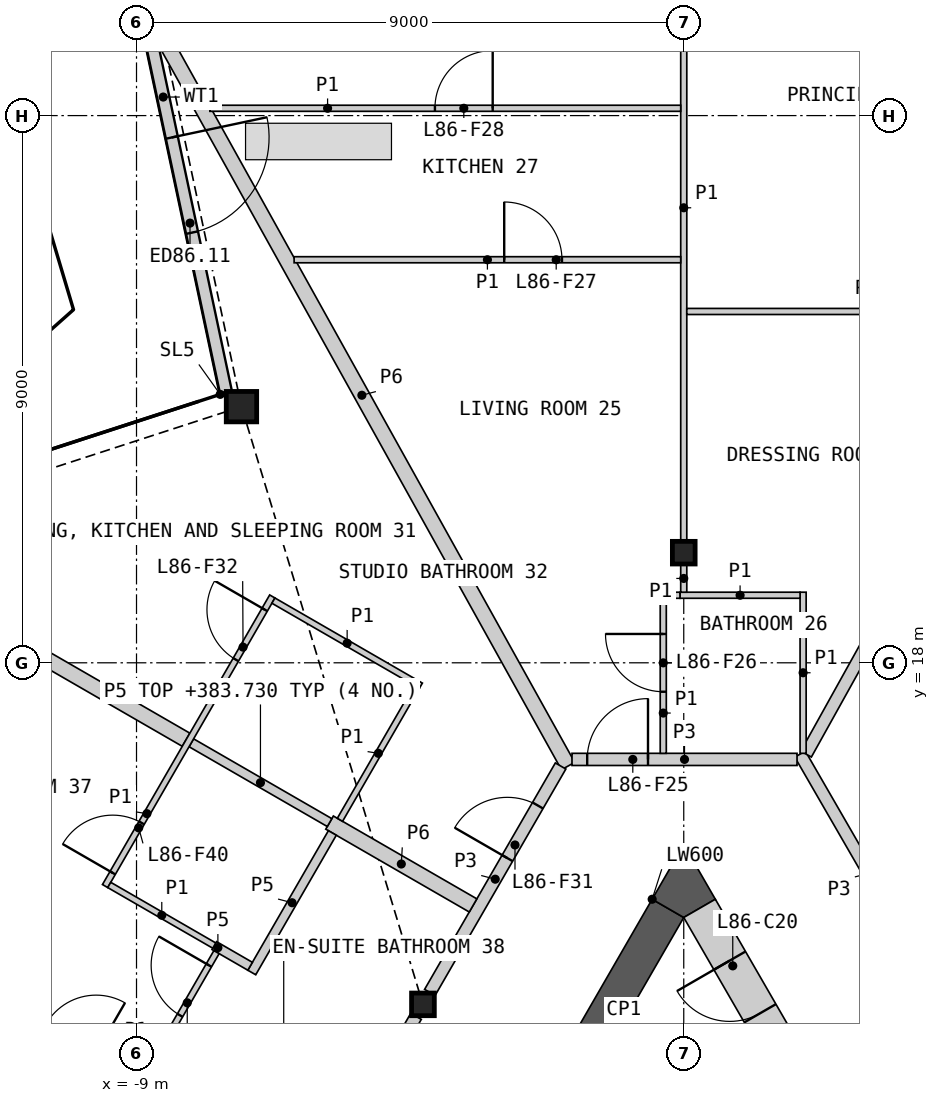
"""IFC4 building model, lengths in metres.
Left out: names, types, materials, properties, quantities, classifications, styles, units other than length and angle.
Written with IfcOpenShell. Run it as: python <this file> out.ifc"""

import sys

from ifc_helpers import new_model, si_unit, direction, frame, frame_2d, origin, origin_2d, place, context, subcontext, project, spatial, polyline, rectangle, hollow_rectangle, i_section, outline, extrude, element, fill, save


model = new_model("IFC4")
c1 = context("Model", 3, precision=1e-05, world=origin(), true_north=direction((0.0, 1.0)))
c2 = subcontext(c1, "Body", "Model", "MODEL_VIEW")
j1 = project(units=[si_unit("LENGTHUNIT", "METRE"), si_unit("PLANEANGLEUNIT", "RADIAN")], contexts=[c1])
p1 = place(None, origin())
s1 = spatial("IfcSite", under=j1, at=p1, CompositionType="ELEMENT")
p2 = place(p1, origin())
s2 = spatial("IfcBuilding", under=s1, at=p2, CompositionType="ELEMENT")
p3 = place(p2, frame((0.0, 0.0, 381.4)))
s3 = spatial("IfcBuildingStorey", under=s2, at=p3, CompositionType="ELEMENT", Elevation=381.4)
p4 = place(p3, frame((-7.274, 22.213, 0.0), z_axis=(0.0, 0.0, 1.0), x_axis=(1.0, 0.0, 0.0)))
e1 = element("IfcColumn", 1, at=p4, inside=s3, PredefinedType="COLUMN", context=c2, shape_type="SweptSolid", body=[
    extrude(hollow_rectangle(XDim=0.5, YDim=0.5, WallThickness=0.03, at=origin_2d()), origin(), (0.0, 0.0, 1.0), 3.4),
])
for number, where, z_axis, x_axis in (
    (2, (0.0, 19.811, 0.0), (0.0, 0.0, 1.0), (1.0, 0.0, 0.0)),
    (3, (-4.289, 12.382, 0.0), (0.0, 0.0, 1.0), (1.0, 0.0, 0.0)),
):
    element("IfcColumn", number, at=place(p3, frame(where, z_axis=z_axis, x_axis=x_axis)), inside=s3, PredefinedType="COLUMN", context=c2, shape_type="SweptSolid", body=[
        extrude(i_section(OverallWidth=0.374, OverallDepth=0.372, WebThickness=0.016, FlangeThickness=0.026, at=origin_2d()), origin(), (0.0, 0.0, 1.0), 3.4),
    ])
p5 = place(p3, frame((-8.905, 28.922, 0.0), z_axis=(0.0, 0.0, 1.0), x_axis=(0.207917488951, -0.978146368285, 0.0)))
e4 = element("IfcWall", 4, at=p5, inside=s3, PredefinedType="SOLIDWALL", context=c2, shape_type="SweptSolid", body=[
    extrude(rectangle(XDim=6.612, YDim=0.2, at=frame_2d((3.306, 0.0))), origin(), (0.0, 0.0, 1.0), 2.634),
])
p6 = place(p5, frame((2.333, 0.0, 0.0)))
e5 = element("IfcOpeningElement", 5, at=p6, cuts=e4, PredefinedType="OPENING", context=c2, shape_type="SweptSolid", body=[
    extrude(rectangle(XDim=1.6, YDim=2.25, at=frame_2d((0.8, 1.125))), frame((0.0, 0.11, 0.0), z_axis=(0.0, -1.0, 0.0), x_axis=(1.0, 0.0, 0.0)), (0.0, 0.0, 1.0), 0.22),
])
p7 = place(p3, frame((-0.26, 13.961, 0.0), z_axis=(0.0, 0.0, 1.0), x_axis=(-0.499980485389, -0.866036670257, 0.0)))
e6 = element("IfcWall", 6, at=p7, inside=s3, PredefinedType="SHEAR", context=c2, shape_type="SweptSolid", body=[
    extrude(rectangle(XDim=4.559, YDim=0.6, at=frame_2d((2.28, 0.0))), origin(), (0.0, 0.0, 1.0), 3.1),
])
p8 = place(p3, origin())
e7 = element("IfcWall", 7, at=p8, inside=s3, PredefinedType="SHEAR", context=c2, shape_type="SweptSolid", body=[
    extrude(outline(polyline([(-0.52, 14.111), (0.0, 15.011), (0.52, 14.111), (0.0, 13.811), (-0.52, 14.111)])), origin(), (0.0, 0.0, 1.0), 3.1),
])
p9 = place(p3, frame((1.556, 11.716, 0.0), z_axis=(0.0, 0.0, 1.0), x_axis=(-0.500018667571, 0.866014625789, 0.0)))
e8 = element("IfcWall", 8, at=p9, inside=s3, PredefinedType="SHEAR", context=c2, shape_type="SweptSolid", body=[
    extrude(rectangle(XDim=2.592, YDim=0.6, at=frame_2d((1.296, 0.0))), origin(), (0.0, 0.0, 1.0), 3.1),
])
p10 = place(p9, frame((0.6, 0.0, 0.0)))
e9 = element("IfcOpeningElement", 9, at=p10, cuts=e8, PredefinedType="OPENING", context=c2, shape_type="SweptSolid", body=[
    extrude(rectangle(XDim=1.0, YDim=2.1, at=frame_2d((0.5, 1.05))), frame((0.0, 0.31, 0.0), z_axis=(0.0, -1.0, 0.0), x_axis=(1.0, 0.0, 0.0)), (0.0, 0.0, 1.0), 0.62),
])
p11 = place(p3, frame((-8.685, 28.499, 0.0), z_axis=(0.0, 0.0, 1.0), x_axis=(0.486017177904, -0.873949256412, 0.0)))
e10 = element("IfcWall", 10, at=p11, inside=s3, PredefinedType="PARTITIONING", context=c2, shape_type="SweptSolid", body=[
    extrude(rectangle(XDim=13.956, YDim=0.25, at=frame_2d((6.978, 0.0))), origin(), (0.0, 0.0, 1.0), 2.33),
])
p12 = place(p3, frame((-8.465, 5.15, 0.0), z_axis=(0.0, 0.0, 1.0), x_axis=(0.499992155518, 0.866029932751, 0.0)))
e11 = element("IfcWall", 11, at=p12, inside=s3, PredefinedType="PARTITIONING", context=c2, shape_type="SweptSolid", body=[
    extrude(rectangle(XDim=8.123, YDim=0.2, at=frame_2d((4.062, 0.0))), origin(), (0.0, 0.0, 1.0), 3.1),
])
p13 = place(p12, frame((1.153, 0.0, 0.0)))
e12 = element("IfcOpeningElement", 12, at=p13, cuts=e11, PredefinedType="OPENING", context=c2, shape_type="SweptSolid", body=[
    extrude(rectangle(XDim=1.0, YDim=2.1, at=frame_2d((0.5, 1.05))), frame((0.0, 0.11, 0.0), z_axis=(0.0, -1.0, 0.0), x_axis=(1.0, 0.0, 0.0)), (0.0, 0.0, 1.0), 0.22),
])
p14 = place(p3, frame((-13.669, 19.9, 0.0), z_axis=(0.0, 0.0, 1.0), x_axis=(0.866032778651, -0.499987226139, 0.0)))
e13 = element("IfcWall", 13, at=p14, inside=s3, PredefinedType="PARTITIONING", context=c2, shape_type="SweptSolid", body=[
    extrude(rectangle(XDim=6.332, YDim=0.25, at=frame_2d((3.166, 0.0))), origin(), (0.0, 0.0, 1.0), 2.33),
])
p15 = place(p3, frame((1.913, 16.498, 0.0), z_axis=(0.0, 0.0, 1.0), x_axis=(0.499974648164, -0.866040040179, 0.0)))
e14 = element("IfcWall", 14, at=p15, inside=s3, PredefinedType="PARTITIONING", context=c2, shape_type="SweptSolid", body=[
    extrude(rectangle(XDim=4.525, YDim=0.2, at=frame_2d((2.263, 0.0))), origin(), (0.0, 0.0, 1.0), 3.1),
])
p16 = place(p3, frame((-4.176, 12.579, 0.0), z_axis=(0.0, 0.0, 1.0), x_axis=(0.500004215162, 0.866022970146, 0.0)))
e15 = element("IfcWall", 15, at=p16, inside=s3, PredefinedType="PARTITIONING", context=c2, shape_type="SweptSolid", body=[
    extrude(rectangle(XDim=4.3, YDim=0.2, at=frame_2d((2.15, 0.0))), origin(), (0.0, 0.0, 1.0), 3.1),
])
p17 = place(p16, frame((2.55, 0.0, 0.0)))
e16 = element("IfcOpeningElement", 16, at=p17, cuts=e15, PredefinedType="OPENING", context=c2, shape_type="SweptSolid", body=[
    extrude(rectangle(XDim=1.0, YDim=2.1, at=frame_2d((0.5, 1.05))), frame((0.0, 0.11, 0.0), z_axis=(0.0, -1.0, 0.0), x_axis=(1.0, 0.0, 0.0)), (0.0, 0.0, 1.0), 0.22),
])
p18 = place(p3, frame((-1.838, 16.411, 0.0), z_axis=(0.0, 0.0, 1.0), x_axis=(1.0, 0.0, 0.0)))
e17 = element("IfcWall", 17, at=p18, inside=s3, PredefinedType="PARTITIONING", context=c2, shape_type="SweptSolid", body=[
    extrude(rectangle(XDim=3.701, YDim=0.2, at=frame_2d((1.851, 0.0))), origin(), (0.0, 0.0, 1.0), 3.1),
])
p19 = place(p18, frame((0.25, 0.0, 0.0)))
e18 = element("IfcOpeningElement", 18, at=p19, cuts=e17, PredefinedType="OPENING", context=c2, shape_type="SweptSolid", body=[
    extrude(rectangle(XDim=1.0, YDim=2.1, at=frame_2d((0.5, 1.05))), frame((0.0, 0.11, 0.0), z_axis=(0.0, -1.0, 0.0), x_axis=(1.0, 0.0, 0.0)), (0.0, 0.0, 1.0), 0.22),
])
p20 = place(p3, frame((-5.825, 15.372, 0.0), z_axis=(0.0, 0.0, 1.0), x_axis=(0.866051307416, -0.49995513091, 0.0)))
e19 = element("IfcWall", 19, at=p20, inside=s3, PredefinedType="PARTITIONING", context=c2, shape_type="SweptSolid", body=[
    extrude(rectangle(XDim=2.725, YDim=0.25, at=frame_2d((1.362, 0.0))), origin(), (0.0, 0.0, 1.0), 2.33),
])
p21 = place(p3, frame((2.012, 16.498, 0.0), z_axis=(0.0, 0.0, 1.0), x_axis=(0.485991996179, 0.873963259897, 0.0)))
e20 = element("IfcWall", 20, at=p21, inside=s3, PredefinedType="PARTITIONING", context=c2, shape_type="SweptSolid", body=[
    extrude(rectangle(XDim=14.073, YDim=0.2, at=frame_2d((7.036, 0.0))), origin(), (0.0, 0.0, 1.0), 2.33),
])
p22 = place(p3, frame((-8.098, 16.684, 0.0), z_axis=(0.0, 0.0, 1.0), x_axis=(0.866036909293, -0.499980071345, 0.0)))
e21 = element("IfcWall", 21, at=p22, inside=s3, PredefinedType="PLUMBINGWALL", context=c2, shape_type="SweptSolid", body=[
    extrude(rectangle(XDim=2.625, YDim=0.15, at=frame_2d((1.312, 0.0))), origin(), (0.0, 0.0, 1.0), 2.33),
])
p23 = place(p3, frame((-7.104, 12.906, 0.0), z_axis=(0.0, 0.0, 1.0), x_axis=(0.499993606316, 0.866029095148, 0.0)))
e22 = element("IfcWall", 22, at=p23, inside=s3, PredefinedType="PLUMBINGWALL", context=c2, shape_type="SweptSolid", body=[
    extrude(rectangle(XDim=2.65, YDim=0.15, at=frame_2d((1.325, 0.0))), origin(), (0.0, 0.0, 1.0), 2.33),
])
p24 = place(p3, frame((-7.72, 13.349, 0.0), z_axis=(0.0, 0.0, 1.0), x_axis=(0.866113839764, -0.499846793097, 0.0)))
e23 = element("IfcWall", 23, at=p24, inside=s3, PredefinedType="PLUMBINGWALL", context=c2, shape_type="SweptSolid", body=[
    extrude(rectangle(XDim=0.68, YDim=0.15, at=frame_2d((0.34, 0.0))), origin(), (0.0, 0.0, 1.0), 2.33),
])
p25 = place(p3, frame((0.0, 20.008, 0.0), z_axis=(0.0, 0.0, 1.0), x_axis=(0.0, 1.0, 0.0)))
e24 = element("IfcWall", 24, at=p25, inside=s3, PredefinedType="PARTITIONING", context=c2, shape_type="SweptSolid", body=[
    extrude(rectangle(XDim=10.951, YDim=0.1, at=frame_2d((5.476, 0.0))), origin(), (0.0, 0.0, 1.0), 2.33),
])
p26 = place(p25, frame((8.851, 0.0, 0.0)))
e25 = element("IfcOpeningElement", 25, at=p26, cuts=e24, PredefinedType="OPENING", context=c2, shape_type="SweptSolid", body=[
    extrude(rectangle(XDim=0.95, YDim=2.1, at=frame_2d((0.475, 1.05))), frame((0.0, 0.06, 0.0), z_axis=(0.0, -1.0, 0.0), x_axis=(1.0, 0.0, 0.0)), (0.0, 0.0, 1.0), 0.12),
])
p27 = place(p3, frame((-7.793, 27.12, 0.0), z_axis=(0.0, 0.0, 1.0), x_axis=(1.0, 0.0, 0.0)))
e26 = element("IfcWall", 26, at=p27, inside=s3, PredefinedType="PARTITIONING", context=c2, shape_type="SweptSolid", body=[
    extrude(rectangle(XDim=7.743, YDim=0.1, at=frame_2d((3.872, 0.0))), origin(), (0.0, 0.0, 1.0), 2.33),
])
p28 = place(p27, frame((3.701, 0.0, 0.0)))
e27 = element("IfcOpeningElement", 27, at=p28, cuts=e26, PredefinedType="OPENING", context=c2, shape_type="SweptSolid", body=[
    extrude(rectangle(XDim=0.95, YDim=2.1, at=frame_2d((0.475, 1.05))), frame((0.0, 0.06, 0.0), z_axis=(0.0, -1.0, 0.0), x_axis=(1.0, 0.0, 0.0)), (0.0, 0.0, 1.0), 0.12),
])
p29 = place(p3, frame((-6.408, 24.629, 0.0), z_axis=(0.0, 0.0, 1.0), x_axis=(1.0, 0.0, 0.0)))
e28 = element("IfcWall", 28, at=p29, inside=s3, PredefinedType="PARTITIONING", context=c2, shape_type="SweptSolid", body=[
    extrude(rectangle(XDim=6.358, YDim=0.1, at=frame_2d((3.179, 0.0))), origin(), (0.0, 0.0, 1.0), 2.33),
])
p30 = place(p29, frame((3.455, 0.0, 0.0)))
e29 = element("IfcOpeningElement", 29, at=p30, cuts=e28, PredefinedType="OPENING", context=c2, shape_type="SweptSolid", body=[
    extrude(rectangle(XDim=0.95, YDim=2.1, at=frame_2d((0.475, 1.05))), frame((0.0, 0.06, 0.0), z_axis=(0.0, -1.0, 0.0), x_axis=(1.0, 0.0, 0.0)), (0.0, 0.0, 1.0), 0.12),
])
p31 = place(p3, frame((0.05, 23.778, 0.0), z_axis=(0.0, 0.0, 1.0), x_axis=(1.0, 0.0, 0.0)))
e30 = element("IfcWall", 30, at=p31, inside=s3, PredefinedType="PARTITIONING", context=c2, shape_type="SweptSolid", body=[
    extrude(rectangle(XDim=5.91, YDim=0.1, at=frame_2d((2.955, 0.0))), origin(), (0.0, 0.0, 1.0), 2.33),
])
p32 = place(p31, frame((3.291, 0.0, 0.0)))
e31 = element("IfcOpeningElement", 31, at=p32, cuts=e30, PredefinedType="OPENING", context=c2, shape_type="SweptSolid", body=[
    extrude(rectangle(XDim=0.95, YDim=2.1, at=frame_2d((0.475, 1.05))), frame((0.0, 0.06, 0.0), z_axis=(0.0, -1.0, 0.0), x_axis=(1.0, 0.0, 0.0)), (0.0, 0.0, 1.0), 0.12),
])
p33 = place(p3, frame((-9.517, 14.328, 0.0), z_axis=(0.0, 0.0, 1.0), x_axis=(0.499996545922, 0.866027397988, 0.0)))
e32 = element("IfcWall", 32, at=p33, inside=s3, PredefinedType="PARTITIONING", context=c2, shape_type="SweptSolid", body=[
    extrude(rectangle(XDim=5.5, YDim=0.1, at=frame_2d((2.75, 0.0))), origin(), (0.0, 0.0, 1.0), 2.33),
])
p34 = place(p33, frame((4.3, 0.0, 0.0)))
e33 = element("IfcOpeningElement", 33, at=p34, cuts=e32, PredefinedType="OPENING", context=c2, shape_type="SweptSolid", body=[
    extrude(rectangle(XDim=0.95, YDim=2.1, at=frame_2d((0.475, 1.05))), frame((0.0, 0.06, 0.0), z_axis=(0.0, -1.0, 0.0), x_axis=(1.0, 0.0, 0.0)), (0.0, 0.0, 1.0), 0.12),
])
p35 = place(p33, frame((0.25, 0.0, 0.0)))
e34 = element("IfcOpeningElement", 34, at=p35, cuts=e32, PredefinedType="OPENING", context=c2, shape_type="SweptSolid", body=[
    extrude(rectangle(XDim=0.95, YDim=2.1, at=frame_2d((0.475, 1.05))), frame((0.0, 0.06, 0.0), z_axis=(0.0, -1.0, 0.0), x_axis=(1.0, 0.0, 0.0)), (0.0, 0.0, 1.0), 0.12),
])
p36 = place(p3, frame((-12.214, 13.056, 0.0), z_axis=(0.0, 0.0, 1.0), x_axis=(0.866017452598, -0.500013771606, 0.0)))
e35 = element("IfcWall", 35, at=p36, inside=s3, PredefinedType="PARTITIONING", context=c2, shape_type="SweptSolid", body=[
    extrude(rectangle(XDim=4.425, YDim=0.1, at=frame_2d((2.213, 0.0))), origin(), (0.0, 0.0, 1.0), 2.33),
])
p37 = place(p36, frame((1.994, 0.0, 0.0)))
e36 = element("IfcOpeningElement", 36, at=p37, cuts=e35, PredefinedType="OPENING", context=c2, shape_type="SweptSolid", body=[
    extrude(rectangle(XDim=0.95, YDim=2.1, at=frame_2d((0.475, 1.05))), frame((0.0, 0.06, 0.0), z_axis=(0.0, -1.0, 0.0), x_axis=(1.0, 0.0, 0.0)), (0.0, 0.0, 1.0), 0.12),
])
p38 = place(p3, frame((-6.748, 19.023, 0.0), z_axis=(0.0, 0.0, 1.0), x_axis=(0.866034573852, -0.49998411664, 0.0)))
e37 = element("IfcWall", 37, at=p38, inside=s3, PredefinedType="PARTITIONING", context=c2, shape_type="SweptSolid", body=[
    extrude(rectangle(XDim=2.8, YDim=0.1, at=frame_2d((1.4, 0.0))), origin(), (0.0, 0.0, 1.0), 2.33),
])
p39 = place(p3, frame((-5.654, 15.418, 0.0), z_axis=(0.0, 0.0, 1.0), x_axis=(0.500048846702, 0.865997200291, 0.0)))
e38 = element("IfcWall", 38, at=p39, inside=s3, PredefinedType="PARTITIONING", context=c2, shape_type="SweptSolid", body=[
    extrude(rectangle(XDim=2.525, YDim=0.1, at=frame_2d((1.263, 0.0))), origin(), (0.0, 0.0, 1.0), 2.33),
])
p40 = place(p3, frame((1.963, 16.511, 0.0), z_axis=(0.0, 0.0, 1.0), x_axis=(0.0, 1.0, 0.0)))
e39 = element("IfcWall", 39, at=p40, inside=s3, PredefinedType="PARTITIONING", context=c2, shape_type="SweptSolid", body=[
    extrude(rectangle(XDim=2.65, YDim=0.1, at=frame_2d((1.325, 0.0))), origin(), (0.0, 0.0, 1.0), 2.33),
])
p41 = place(p3, frame((-0.337, 16.511, 0.0), z_axis=(0.0, 0.0, 1.0), x_axis=(0.0, 1.0, 0.0)))
e40 = element("IfcWall", 40, at=p41, inside=s3, PredefinedType="PARTITIONING", context=c2, shape_type="SweptSolid", body=[
    extrude(rectangle(XDim=2.649, YDim=0.1, at=frame_2d((1.325, 0.0))), origin(), (0.0, 0.0, 1.0), 2.33),
])
p42 = place(p41, frame((1.013, 0.0, 0.0)))
e41 = element("IfcOpeningElement", 41, at=p42, cuts=e40, PredefinedType="OPENING", context=c2, shape_type="SweptSolid", body=[
    extrude(rectangle(XDim=0.95, YDim=2.1, at=frame_2d((0.475, 1.05))), frame((0.0, 0.06, 0.0), z_axis=(0.0, -1.0, 0.0), x_axis=(1.0, 0.0, 0.0)), (0.0, 0.0, 1.0), 0.12),
])
p43 = place(p3, frame((-8.872, 11.184, 0.0), z_axis=(0.0, 0.0, 1.0), x_axis=(0.499986429846, 0.866033238375, 0.0)))
e42 = element("IfcWall", 42, at=p43, inside=s3, PredefinedType="PARTITIONING", context=c2, shape_type="SweptSolid", body=[
    extrude(rectangle(XDim=2.375, YDim=0.1, at=frame_2d((1.188, 0.0))), origin(), (0.0, 0.0, 1.0), 2.33),
])
p44 = place(p43, frame((1.175, 0.0, 0.0)))
e43 = element("IfcOpeningElement", 43, at=p44, cuts=e42, PredefinedType="OPENING", context=c2, shape_type="SweptSolid", body=[
    extrude(rectangle(XDim=0.95, YDim=2.1, at=frame_2d((0.475, 1.05))), frame((0.0, 0.06, 0.0), z_axis=(0.0, -1.0, 0.0), x_axis=(1.0, 0.0, 0.0)), (0.0, 0.0, 1.0), 0.12),
])
p45 = place(p3, frame((-9.448, 14.346, 0.0), z_axis=(0.0, 0.0, 1.0), x_axis=(0.866020521143, -0.500008456887, 0.0)))
e44 = element("IfcWall", 44, at=p45, inside=s3, PredefinedType="PARTITIONING", context=c2, shape_type="SweptSolid", body=[
    extrude(rectangle(XDim=1.995, YDim=0.1, at=frame_2d((0.998, 0.0))), origin(), (0.0, 0.0, 1.0), 2.33),
])
p46 = place(p3, frame((-0.06, 19.111, 0.0), z_axis=(0.0, 0.0, 1.0), x_axis=(1.0, 0.0, 0.0)))
e45 = element("IfcWall", 45, at=p46, inside=s3, PredefinedType="PARTITIONING", context=c2, shape_type="SweptSolid", body=[
    extrude(rectangle(XDim=1.973, YDim=0.1, at=frame_2d((0.987, 0.0))), origin(), (0.0, 0.0, 1.0), 2.33),
])
p47 = place(p3, frame((0.0, 19.161, 0.0), z_axis=(0.0, 0.0, 1.0), x_axis=(0.0, 1.0, 0.0)))
e46 = element("IfcWall", 46, at=p47, inside=s3, PredefinedType="PARTITIONING", context=c2, shape_type="SweptSolid", body=[
    extrude(rectangle(XDim=0.453, YDim=0.1, at=frame_2d((0.227, 0.0))), origin(), (0.0, 0.0, 1.0), 2.33),
])
p48 = place(p3, frame((-0.287, 19.11, 0.0), z_axis=(0.0, 0.0, 1.0), x_axis=(0.999994683407, 0.003260852229, 0.0)))
e47 = element("IfcWall", 47, at=p48, inside=s3, PredefinedType="PARTITIONING", context=c2, shape_type="SweptSolid", body=[
    extrude(rectangle(XDim=0.225, YDim=0.1, at=frame_2d((0.112, 0.0))), origin(), (0.0, 0.0, 1.0), 2.33),
])
p49 = place(p6, origin())
e48 = element("IfcDoor", 48, at=p49, inside=s3, OperationType="DOUBLE_DOOR_SINGLE_SWING", PredefinedType="DOOR", context=c2, shape_type="SweptSolid", body=[
    extrude(rectangle(XDim=1.6, YDim=2.25, at=frame_2d((0.8, 1.125))), frame((0.0, 0.025, 0.0), z_axis=(0.0, -1.0, 0.0), x_axis=(1.0, 0.0, 0.0)), (0.0, 0.0, 1.0), 0.05),
])
fill(e5, e48)
p50 = place(p10, origin())
e49 = element("IfcDoor", 49, at=p50, inside=s3, OperationType="SINGLE_SWING_RIGHT", PredefinedType="DOOR", context=c2, shape_type="SweptSolid", body=[
    extrude(rectangle(XDim=1.0, YDim=2.1, at=frame_2d((0.5, 1.05))), frame((0.0, 0.055, 0.0), z_axis=(0.0, -1.0, 0.0), x_axis=(1.0, 0.0, 0.0)), (0.0, 0.0, 1.0), 0.05),
])
fill(e9, e49)
p51 = place(p19, origin())
e50 = element("IfcDoor", 50, at=p51, inside=s3, OperationType="SINGLE_SWING_RIGHT", PredefinedType="DOOR", context=c2, shape_type="SweptSolid", body=[
    extrude(rectangle(XDim=1.0, YDim=2.1, at=frame_2d((0.5, 1.05))), frame((0.0, 0.025, 0.0), z_axis=(0.0, -1.0, 0.0), x_axis=(1.0, 0.0, 0.0)), (0.0, 0.0, 1.0), 0.05),
])
fill(e18, e50)
p52 = place(p42, origin())
e51 = element("IfcDoor", 51, at=p52, inside=s3, OperationType="SINGLE_SWING_RIGHT", PredefinedType="DOOR", context=c2, shape_type="SweptSolid", body=[
    extrude(rectangle(XDim=0.95, YDim=2.1, at=frame_2d((0.475, 1.05))), frame((0.0, 0.025, 0.0), z_axis=(0.0, -1.0, 0.0), x_axis=(1.0, 0.0, 0.0)), (0.0, 0.0, 1.0), 0.05),
])
fill(e41, e51)
p53 = place(p30, origin())
e52 = element("IfcDoor", 52, at=p53, inside=s3, OperationType="SINGLE_SWING_LEFT", PredefinedType="DOOR", context=c2, shape_type="SweptSolid", body=[
    extrude(rectangle(XDim=0.95, YDim=2.1, at=frame_2d((0.475, 1.05))), frame((0.0, 0.025, 0.0), z_axis=(0.0, -1.0, 0.0), x_axis=(1.0, 0.0, 0.0)), (0.0, 0.0, 1.0), 0.05),
])
fill(e29, e52)
p54 = place(p28, origin())
e53 = element("IfcDoor", 53, at=p54, inside=s3, OperationType="SINGLE_SWING_RIGHT", PredefinedType="DOOR", context=c2, shape_type="SweptSolid", body=[
    extrude(rectangle(XDim=0.95, YDim=2.1, at=frame_2d((0.475, 1.05))), frame((0.0, 0.025, 0.0), z_axis=(0.0, -1.0, 0.0), x_axis=(1.0, 0.0, 0.0)), (0.0, 0.0, 1.0), 0.05),
])
fill(e27, e53)
p55 = place(p17, origin())
e54 = element("IfcDoor", 54, at=p55, inside=s3, OperationType="SINGLE_SWING_LEFT", PredefinedType="DOOR", context=c2, shape_type="SweptSolid", body=[
    extrude(rectangle(XDim=1.0, YDim=2.1, at=frame_2d((0.5, 1.05))), frame((0.0, 0.025, 0.0), z_axis=(0.0, -1.0, 0.0), x_axis=(1.0, 0.0, 0.0)), (0.0, 0.0, 1.0), 0.05),
])
fill(e16, e54)
p56 = place(p34, origin())
e55 = element("IfcDoor", 55, at=p56, inside=s3, OperationType="SINGLE_SWING_RIGHT", PredefinedType="DOOR", context=c2, shape_type="SweptSolid", body=[
    extrude(rectangle(XDim=0.95, YDim=2.1, at=frame_2d((0.475, 1.05))), frame((0.0, 0.025, 0.0), z_axis=(0.0, -1.0, 0.0), x_axis=(1.0, 0.0, 0.0)), (0.0, 0.0, 1.0), 0.05),
])
fill(e33, e55)
p57 = place(p37, origin())
e56 = element("IfcDoor", 56, at=p57, inside=s3, OperationType="SINGLE_SWING_RIGHT", PredefinedType="DOOR", context=c2, shape_type="SweptSolid", body=[
    extrude(rectangle(XDim=0.95, YDim=2.1, at=frame_2d((0.475, 1.05))), frame((0.0, 0.025, 0.0), z_axis=(0.0, -1.0, 0.0), x_axis=(1.0, 0.0, 0.0)), (0.0, 0.0, 1.0), 0.05),
])
fill(e36, e56)
p58 = place(p44, origin())
e57 = element("IfcDoor", 57, at=p58, inside=s3, OperationType="SINGLE_SWING_RIGHT", PredefinedType="DOOR", context=c2, shape_type="SweptSolid", body=[
    extrude(rectangle(XDim=0.95, YDim=2.1, at=frame_2d((0.475, 1.05))), frame((0.0, 0.025, 0.0), z_axis=(0.0, -1.0, 0.0), x_axis=(1.0, 0.0, 0.0)), (0.0, 0.0, 1.0), 0.05),
])
fill(e43, e57)
p59 = place(p35, origin())
e58 = element("IfcDoor", 58, at=p59, inside=s3, OperationType="SINGLE_SWING_LEFT", PredefinedType="DOOR", context=c2, shape_type="SweptSolid", body=[
    extrude(rectangle(XDim=0.95, YDim=2.1, at=frame_2d((0.475, 1.05))), frame((0.0, 0.025, 0.0), z_axis=(0.0, -1.0, 0.0), x_axis=(1.0, 0.0, 0.0)), (0.0, 0.0, 1.0), 0.05),
])
fill(e34, e58)
save(model, sys.argv[1])
